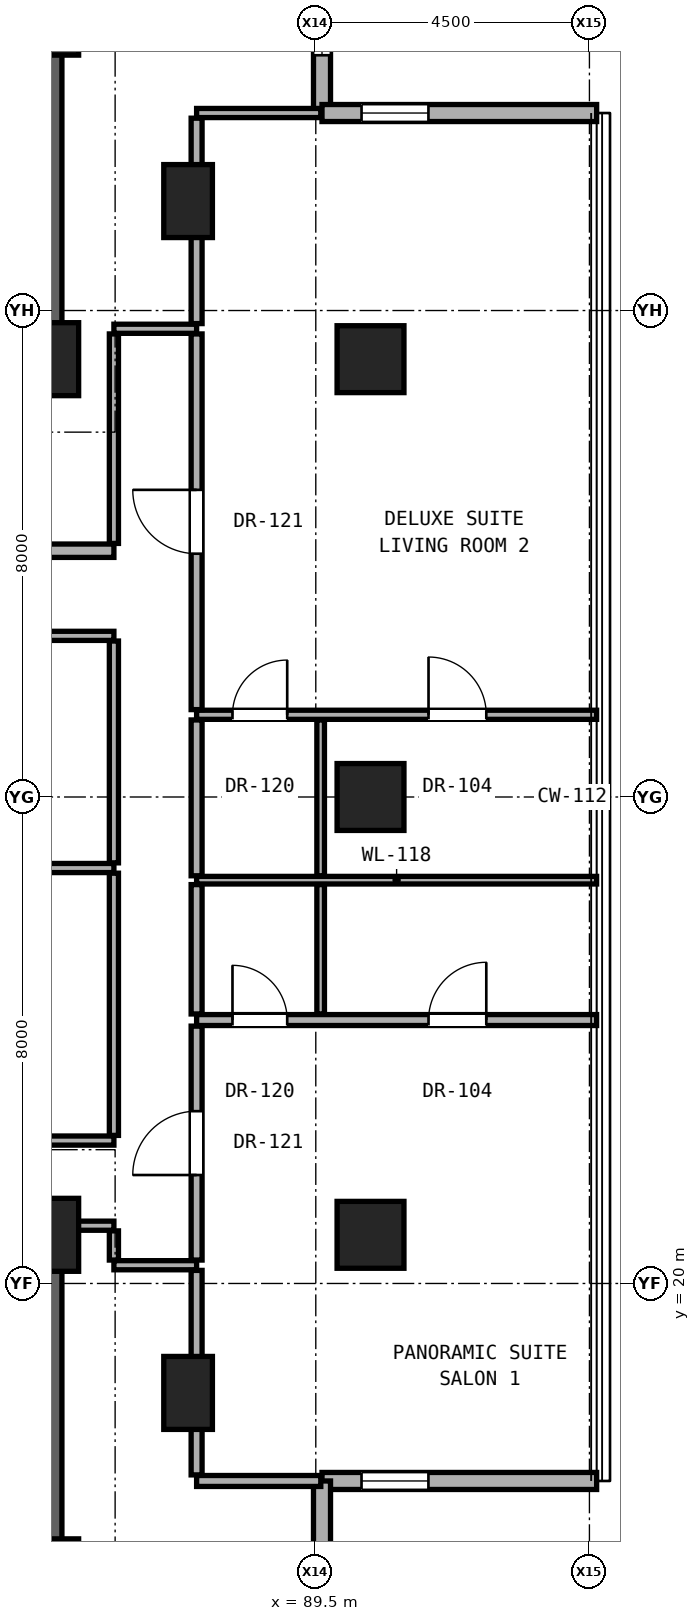
"""IFC4 building model, lengths in metres.
Left out: names, types, materials, properties, quantities, classifications, styles, units other than length and angle.
Written with IfcOpenShell. Run it as: python <this file> out.ifc"""

import sys

from ifc_helpers import new_model, si_unit, direction, frame, frame_2d, origin, origin_2d, place, context, subcontext, project, spatial, rectangle, hollow_rectangle, extrude, element, fill, save


model = new_model("IFC4")
c1 = context("Model", 3, precision=1e-05, world=origin(), true_north=direction((0.0, 1.0)))
c2 = subcontext(c1, "Body", "Model", "MODEL_VIEW")
j1 = project(units=[si_unit("LENGTHUNIT", "METRE"), si_unit("PLANEANGLEUNIT", "RADIAN")], contexts=[c1])
p1 = place(None, origin())
s1 = spatial("IfcSite", under=j1, at=p1, CompositionType="ELEMENT")
p2 = place(p1, origin())
s2 = spatial("IfcBuilding", under=s1, at=p2, CompositionType="ELEMENT")
p3 = place(p2, frame((0.0, 0.0, 95.0)))
s3 = spatial("IfcBuildingStorey", under=s2, at=p3, CompositionType="ELEMENT", Elevation=95.0)
for number, where, z_axis, x_axis in (
    (1, (85.0, 15.2, 0.0), (0.0, 0.0, 1.0), (1.0, 0.0, 0.0)),
    (2, (85.0, 20.8, 0.0), (0.0, 0.0, 1.0), (1.0, 0.0, 0.0)),
    (3, (85.0, 35.2, 0.0), (0.0, 0.0, 1.0), (1.0, 0.0, 0.0)),
    (4, (85.0, 40.8, 0.0), (0.0, 0.0, 1.0), (1.0, 0.0, 0.0)),
):
    element("IfcColumn", number, at=place(p3, frame(where, z_axis=z_axis, x_axis=x_axis)), inside=s3, PredefinedType="COLUMN", context=c2, shape_type="SweptSolid", body=[
        extrude(rectangle(XDim=1.2, YDim=1.2, at=origin_2d()), origin(), (0.0, 0.0, 1.0), 3.3),
    ])
for number, where, z_axis, x_axis in (
    (5, (90.4, 20.8, 0.0), (0.0, 0.0, 1.0), (1.0, 0.0, 0.0)),
    (6, (90.4, 28.0, 0.0), (0.0, 0.0, 1.0), (1.0, 0.0, 0.0)),
    (7, (90.4, 35.2, 0.0), (0.0, 0.0, 1.0), (1.0, 0.0, 0.0)),
):
    element("IfcColumn", number, at=place(p3, frame(where, z_axis=z_axis, x_axis=x_axis)), inside=s3, PredefinedType="COLUMN", context=c2, shape_type="SweptSolid", body=[
        extrude(hollow_rectangle(XDim=1.1, YDim=1.1, WallThickness=0.06, at=origin_2d()), origin(), (0.0, 0.0, 1.0), 3.3),
    ])
for number, where, z_axis, x_axis in (
    (8, (87.4, 18.2, 0.0), (0.0, 0.0, 1.0), (1.0, 0.0, 0.0)),
    (9, (87.4, 37.8, 0.0), (0.0, 0.0, 1.0), (1.0, 0.0, 0.0)),
):
    element("IfcColumn", number, at=place(p3, frame(where, z_axis=z_axis, x_axis=x_axis)), inside=s3, PredefinedType="PILASTER", context=c2, shape_type="SweptSolid", body=[
        extrude(rectangle(XDim=0.8, YDim=1.2, at=origin_2d()), origin(), (0.0, 0.0, 1.0), 3.3),
    ])
for number, where, z_axis, x_axis in (
    (10, (85.0, 35.2, 0.0), (0.0, 0.0, 1.0), (0.0, 1.0, 0.0)),
    (11, (85.0, 15.2, 0.0), (0.0, 0.0, 1.0), (0.0, 1.0, 0.0)),
):
    element("IfcWall", number, at=place(p3, frame(where, z_axis=z_axis, x_axis=x_axis)), inside=s3, PredefinedType="SHEAR", context=c2, shape_type="SweptSolid", body=[
        extrude(rectangle(XDim=5.6, YDim=0.65, at=frame_2d((2.8, 0.0))), origin(), (0.0, 0.0, 1.0), 3.08),
    ])
p4 = place(p3, frame((89.602, 39.248, 0.0), z_axis=(0.0, 0.0, 1.0), x_axis=(0.0, 1.0, 0.0)))
e12 = element("IfcWall", 12, at=p4, inside=s3, PredefinedType="SOLIDWALL", context=c2, shape_type="SweptSolid", body=[
    extrude(rectangle(XDim=4.516, YDim=0.28, at=frame_2d((2.258, 0.0))), origin(), (0.0, 0.0, 1.0), 3.06),
])
p5 = place(p4, frame((0.95, 0.0, 0.85)))
e13 = element("IfcOpeningElement", 13, at=p5, cuts=e12, PredefinedType="OPENING", context=c2, shape_type="SweptSolid", body=[
    extrude(rectangle(XDim=1.1, YDim=2.0, at=frame_2d((0.55, 1.0))), frame((0.0, 0.15, 0.0), z_axis=(0.0, -1.0, 0.0), x_axis=(1.0, 0.0, 0.0)), (0.0, 0.0, 1.0), 0.3),
])
p6 = place(p3, frame((89.602, 16.752, 0.0), z_axis=(0.0, 0.0, 1.0), x_axis=(1.0, 0.0, 0.0)))
e14 = element("IfcWall", 14, at=p6, inside=s3, PredefinedType="SOLIDWALL", context=c2, shape_type="SweptSolid", body=[
    extrude(rectangle(XDim=4.516, YDim=0.28, at=frame_2d((2.258, 0.0))), origin(), (0.0, 0.0, 1.0), 3.06),
])
p7 = place(p6, frame((0.65, 0.0, 0.85)))
e15 = element("IfcOpeningElement", 15, at=p7, cuts=e14, PredefinedType="OPENING", context=c2, shape_type="SweptSolid", body=[
    extrude(rectangle(XDim=1.1, YDim=2.0, at=frame_2d((0.55, 1.0))), frame((0.0, 0.15, 0.0), z_axis=(0.0, -1.0, 0.0), x_axis=(1.0, 0.0, 0.0)), (0.0, 0.0, 1.0), 0.3),
])
p8 = place(p3, frame((89.602, 12.236, 0.0), z_axis=(0.0, 0.0, 1.0), x_axis=(0.0, 1.0, 0.0)))
e16 = element("IfcWall", 16, at=p8, inside=s3, PredefinedType="SOLIDWALL", context=c2, shape_type="SweptSolid", body=[
    extrude(rectangle(XDim=4.516, YDim=0.28, at=frame_2d((2.258, 0.0))), origin(), (0.0, 0.0, 1.0), 3.06),
])
p9 = place(p3, frame((94.118, 39.248, 0.0), z_axis=(0.0, 0.0, 1.0), x_axis=(-1.0, 0.0, 0.0)))
e17 = element("IfcWall", 17, at=p9, inside=s3, PredefinedType="SOLIDWALL", context=c2, shape_type="SweptSolid", body=[
    extrude(rectangle(XDim=4.516, YDim=0.28, at=frame_2d((2.258, 0.0))), origin(), (0.0, 0.0, 1.0), 3.06),
])
p10 = place(p9, frame((2.766, 0.0, 0.85)))
e18 = element("IfcOpeningElement", 18, at=p10, cuts=e17, PredefinedType="OPENING", context=c2, shape_type="SweptSolid", body=[
    extrude(rectangle(XDim=1.1, YDim=2.0, at=frame_2d((0.55, 1.0))), frame((0.0, 0.15, 0.0), z_axis=(0.0, -1.0, 0.0), x_axis=(1.0, 0.0, 0.0)), (0.0, 0.0, 1.0), 0.3),
])
p11 = place(p3, frame((87.54, 16.752, 0.0), z_axis=(0.0, 0.0, 1.0), x_axis=(1.0, 0.0, 0.0)))
e19 = element("IfcWall", 19, at=p11, inside=s3, PredefinedType="PARTITIONING", context=c2, shape_type="SweptSolid", body=[
    extrude(rectangle(XDim=2.042, YDim=0.18, at=frame_2d((1.021, 0.0))), origin(), (0.0, 0.0, 1.0), 3.08),
])
p12 = place(p3, frame((86.18, 20.3, 0.0), z_axis=(0.0, 0.0, 1.0), x_axis=(1.0, 0.0, 0.0)))
e20 = element("IfcWall", 20, at=p12, inside=s3, PredefinedType="PARTITIONING", context=c2, shape_type="SweptSolid", body=[
    extrude(rectangle(XDim=1.36, YDim=0.15, at=frame_2d((0.68, 0.0))), origin(), (0.0, 0.0, 1.0), 3.08),
])
p13 = place(p3, frame((85.32, 20.95, 0.0), z_axis=(0.0, 0.0, 1.0), x_axis=(1.0, 0.0, 0.0)))
e21 = element("IfcWall", 21, at=p13, inside=s3, PredefinedType="PARTITIONING", context=c2, shape_type="SweptSolid", body=[
    extrude(rectangle(XDim=0.86, YDim=0.15, at=frame_2d((0.43, 0.0))), origin(), (0.0, 0.0, 1.0), 2.472),
])
p14 = place(p3, frame((66.68, 22.35, 0.0), z_axis=(0.0, 0.0, 1.0), x_axis=(1.0, 0.0, 0.0)))
e22 = element("IfcWall", 22, at=p14, inside=s3, PredefinedType="PARTITIONING", context=c2, shape_type="SweptSolid", body=[
    extrude(rectangle(XDim=19.5, YDim=0.15, at=frame_2d((9.75, 0.0))), origin(), (0.0, 0.0, 1.0), 2.145),
])
p15 = place(p14, frame((11.99, 0.0, 0.0)))
e23 = element("IfcOpeningElement", 23, at=p15, cuts=e22, PredefinedType="OPENING", context=c2, shape_type="SweptSolid", body=[
    extrude(rectangle(XDim=0.85, YDim=2.01, at=frame_2d((0.425, 1.005))), frame((0.0, 0.085, 0.0), z_axis=(0.0, -1.0, 0.0), x_axis=(1.0, 0.0, 0.0)), (0.0, 0.0, 1.0), 0.17),
])
p16 = place(p3, frame((87.54, 24.332, 0.0), z_axis=(0.0, 0.0, 1.0), x_axis=(1.0, 0.0, 0.0)))
e24 = element("IfcWall", 24, at=p16, inside=s3, PredefinedType="PARTITIONING", context=c2, shape_type="SweptSolid", body=[
    extrude(rectangle(XDim=6.578, YDim=0.18, at=frame_2d((3.289, 0.0))), origin(), (0.0, 0.0, 1.0), 2.216),
])
p17 = place(p16, frame((3.814, 0.0, 0.0)))
e25 = element("IfcOpeningElement", 25, at=p17, cuts=e24, PredefinedType="OPENING", context=c2, shape_type="SweptSolid", body=[
    extrude(rectangle(XDim=0.95, YDim=2.15, at=frame_2d((0.475, 1.075))), frame((0.0, 0.1, 0.0), z_axis=(0.0, -1.0, 0.0), x_axis=(1.0, 0.0, 0.0)), (0.0, 0.0, 1.0), 0.2),
])
p18 = place(p16, frame((0.59, 0.0, 0.0)))
e26 = element("IfcOpeningElement", 26, at=p18, cuts=e24, PredefinedType="OPENING", context=c2, shape_type="SweptSolid", body=[
    extrude(rectangle(XDim=0.9, YDim=2.1, at=frame_2d((0.45, 1.05))), frame((0.0, 0.1, 0.0), z_axis=(0.0, -1.0, 0.0), x_axis=(1.0, 0.0, 0.0)), (0.0, 0.0, 1.0), 0.2),
])
p19 = place(p3, frame((87.54, 26.632, 0.0), z_axis=(0.0, 0.0, 1.0), x_axis=(1.0, 0.0, 0.0)))
e27 = element("IfcWall", 27, at=p19, inside=s3, PredefinedType="PARTITIONING", context=c2, shape_type="SweptSolid", body=[
    extrude(rectangle(XDim=6.578, YDim=0.125, at=frame_2d((3.289, 0.0))), origin(), (0.0, 0.0, 1.0), 2.216),
])
p20 = place(p3, frame((72.05, 26.832, 0.0), z_axis=(0.0, 0.0, 1.0), x_axis=(1.0, 0.0, 0.0)))
e28 = element("IfcWall", 28, at=p20, inside=s3, PredefinedType="PARTITIONING", context=c2, shape_type="SweptSolid", body=[
    extrude(rectangle(XDim=14.13, YDim=0.15, at=frame_2d((7.065, 0.0))), origin(), (0.0, 0.0, 1.0), 2.145),
])
p21 = place(p3, frame((87.54, 29.352, 0.0), z_axis=(0.0, 0.0, 1.0), x_axis=(1.0, 0.0, 0.0)))
e29 = element("IfcWall", 29, at=p21, inside=s3, PredefinedType="PARTITIONING", context=c2, shape_type="SweptSolid", body=[
    extrude(rectangle(XDim=6.578, YDim=0.15, at=frame_2d((3.289, 0.0))), origin(), (0.0, 0.0, 1.0), 2.216),
])
p22 = place(p21, frame((3.814, 0.0, 0.0)))
e30 = element("IfcOpeningElement", 30, at=p22, cuts=e29, PredefinedType="OPENING", context=c2, shape_type="SweptSolid", body=[
    extrude(rectangle(XDim=0.95, YDim=2.15, at=frame_2d((0.475, 1.075))), frame((0.0, 0.085, 0.0), z_axis=(0.0, -1.0, 0.0), x_axis=(1.0, 0.0, 0.0)), (0.0, 0.0, 1.0), 0.17),
])
p23 = place(p21, frame((0.59, 0.0, 0.0)))
e31 = element("IfcOpeningElement", 31, at=p23, cuts=e29, PredefinedType="OPENING", context=c2, shape_type="SweptSolid", body=[
    extrude(rectangle(XDim=0.9, YDim=2.1, at=frame_2d((0.45, 1.05))), frame((0.0, 0.085, 0.0), z_axis=(0.0, -1.0, 0.0), x_axis=(1.0, 0.0, 0.0)), (0.0, 0.0, 1.0), 0.17),
])
p24 = place(p3, frame((66.68, 30.65, 0.0), z_axis=(0.0, 0.0, 1.0), x_axis=(1.0, 0.0, 0.0)))
e32 = element("IfcWall", 32, at=p24, inside=s3, PredefinedType="PARTITIONING", context=c2, shape_type="SweptSolid", body=[
    extrude(rectangle(XDim=19.5, YDim=0.15, at=frame_2d((9.75, 0.0))), origin(), (0.0, 0.0, 1.0), 2.145),
])
p25 = place(p24, frame((3.795, 0.0, 0.0)))
e33 = element("IfcOpeningElement", 33, at=p25, cuts=e32, PredefinedType="OPENING", context=c2, shape_type="SweptSolid", body=[
    extrude(rectangle(XDim=0.85, YDim=2.01, at=frame_2d((0.425, 1.005))), frame((0.0, 0.085, 0.0), z_axis=(0.0, -1.0, 0.0), x_axis=(1.0, 0.0, 0.0)), (0.0, 0.0, 1.0), 0.17),
])
p26 = place(p24, frame((11.99, 0.0, 0.0)))
e34 = element("IfcOpeningElement", 34, at=p26, cuts=e32, PredefinedType="OPENING", context=c2, shape_type="SweptSolid", body=[
    extrude(rectangle(XDim=0.85, YDim=2.01, at=frame_2d((0.425, 1.005))), frame((0.0, 0.085, 0.0), z_axis=(0.0, -1.0, 0.0), x_axis=(1.0, 0.0, 0.0)), (0.0, 0.0, 1.0), 0.17),
])
p27 = place(p3, frame((71.55, 32.05, 0.0), z_axis=(0.0, 0.0, 1.0), x_axis=(1.0, 0.0, 0.0)))
e35 = element("IfcWall", 35, at=p27, inside=s3, PredefinedType="SOLIDWALL", context=c2, shape_type="SweptSolid", body=[
    extrude(rectangle(XDim=14.63, YDim=0.22, at=frame_2d((7.315, 0.0))), origin(), (0.0, 0.0, 1.0), 2.145),
])
p28 = place(p27, frame((6.065, 0.0, 0.0)))
e36 = element("IfcOpeningElement", 36, at=p28, cuts=e35, PredefinedType="OPENING", context=c2, shape_type="SweptSolid", body=[
    extrude(rectangle(XDim=0.85, YDim=2.01, at=frame_2d((0.425, 1.005))), frame((0.0, 0.12, 0.0), z_axis=(0.0, -1.0, 0.0), x_axis=(1.0, 0.0, 0.0)), (0.0, 0.0, 1.0), 0.24),
])
p29 = place(p27, frame((1.65, 0.0, 0.0)))
e37 = element("IfcOpeningElement", 37, at=p29, cuts=e35, PredefinedType="OPENING", context=c2, shape_type="SweptSolid", body=[
    extrude(rectangle(XDim=0.85, YDim=2.01, at=frame_2d((0.425, 1.005))), frame((0.0, 0.12, 0.0), z_axis=(0.0, -1.0, 0.0), x_axis=(1.0, 0.0, 0.0)), (0.0, 0.0, 1.0), 0.24),
])
p30 = place(p3, frame((86.18, 35.7, 0.0), z_axis=(0.0, 0.0, 1.0), x_axis=(1.0, 0.0, 0.0)))
e38 = element("IfcWall", 38, at=p30, inside=s3, PredefinedType="PARTITIONING", context=c2, shape_type="SweptSolid", body=[
    extrude(rectangle(XDim=1.36, YDim=0.15, at=frame_2d((0.68, 0.0))), origin(), (0.0, 0.0, 1.0), 3.08),
])
p31 = place(p3, frame((87.54, 39.248, 0.0), z_axis=(0.0, 0.0, 1.0), x_axis=(1.0, 0.0, 0.0)))
e39 = element("IfcWall", 39, at=p31, inside=s3, PredefinedType="PARTITIONING", context=c2, shape_type="SweptSolid", body=[
    extrude(rectangle(XDim=2.042, YDim=0.15, at=frame_2d((1.021, 0.0))), origin(), (0.0, 0.0, 1.0), 3.08),
])
p32 = place(p3, frame((86.18, 20.385, 0.0), z_axis=(0.0, 0.0, 1.0), x_axis=(0.0, 1.0, 0.0)))
e40 = element("IfcWall", 40, at=p32, inside=s3, PredefinedType="PARTITIONING", context=c2, shape_type="SweptSolid", body=[
    extrude(rectangle(XDim=0.48, YDim=0.15, at=frame_2d((0.24, 0.0))), origin(), (0.0, 0.0, 1.0), 2.472),
])
p33 = place(p3, frame((86.18, 22.435, 0.0), z_axis=(0.0, 0.0, 1.0), x_axis=(0.0, 1.0, 0.0)))
e41 = element("IfcWall", 41, at=p33, inside=s3, PredefinedType="PARTITIONING", context=c2, shape_type="SweptSolid", body=[
    extrude(rectangle(XDim=4.312, YDim=0.15, at=frame_2d((2.156, 0.0))), origin(), (0.0, 0.0, 1.0), 3.08),
])
p34 = place(p3, frame((86.18, 26.917, 0.0), z_axis=(0.0, 0.0, 1.0), x_axis=(0.0, 1.0, 0.0)))
e42 = element("IfcWall", 42, at=p34, inside=s3, PredefinedType="PARTITIONING", context=c2, shape_type="SweptSolid", body=[
    extrude(rectangle(XDim=3.648, YDim=0.15, at=frame_2d((1.824, 0.0))), origin(), (0.0, 0.0, 1.0), 2.299),
])
p35 = place(p3, frame((86.18, 32.17, 0.0), z_axis=(0.0, 0.0, 1.0), x_axis=(0.0, 1.0, 0.0)))
e43 = element("IfcWall", 43, at=p35, inside=s3, PredefinedType="PARTITIONING", context=c2, shape_type="SweptSolid", body=[
    extrude(rectangle(XDim=3.445, YDim=0.15, at=frame_2d((1.723, 0.0))), origin(), (0.0, 0.0, 1.0), 2.472),
])
p36 = place(p3, frame((87.54, 16.852, 0.0), z_axis=(0.0, 0.0, 1.0), x_axis=(0.0, 1.0, 0.0)))
e44 = element("IfcWall", 44, at=p36, inside=s3, PredefinedType="PARTITIONING", context=c2, shape_type="SweptSolid", body=[
    extrude(rectangle(XDim=3.363, YDim=0.18, at=frame_2d((1.682, 0.0))), origin(), (0.0, 0.0, 1.0), 2.456),
])
p37 = place(p3, frame((87.54, 20.385, 0.0), z_axis=(0.0, 0.0, 1.0), x_axis=(0.0, 1.0, 0.0)))
e45 = element("IfcWall", 45, at=p37, inside=s3, PredefinedType="PARTITIONING", context=c2, shape_type="SweptSolid", body=[
    extrude(rectangle(XDim=3.847, YDim=0.18, at=frame_2d((1.923, 0.0))), origin(), (0.0, 0.0, 1.0), 2.472),
])
p38 = place(p37, frame((1.398, 0.0, 0.0)))
e46 = element("IfcOpeningElement", 46, at=p38, cuts=e45, PredefinedType="OPENING", context=c2, shape_type="SweptSolid", body=[
    extrude(rectangle(XDim=1.05, YDim=2.2, at=frame_2d((0.525, 1.1))), frame((0.0, 0.1, 0.0), z_axis=(0.0, -1.0, 0.0), x_axis=(1.0, 0.0, 0.0)), (0.0, 0.0, 1.0), 0.2),
])
p39 = place(p3, frame((87.54, 24.432, 0.0), z_axis=(0.0, 0.0, 1.0), x_axis=(0.0, 1.0, 0.0)))
e47 = element("IfcWall", 47, at=p39, inside=s3, PredefinedType="PARTITIONING", context=c2, shape_type="SweptSolid", body=[
    extrude(rectangle(XDim=2.128, YDim=0.18, at=frame_2d((1.064, 0.0))), origin(), (0.0, 0.0, 1.0), 3.08),
])
p40 = place(p3, frame((87.54, 26.705, 0.0), z_axis=(0.0, 0.0, 1.0), x_axis=(0.0, 1.0, 0.0)))
e48 = element("IfcWall", 48, at=p40, inside=s3, PredefinedType="PARTITIONING", context=c2, shape_type="SweptSolid", body=[
    extrude(rectangle(XDim=2.562, YDim=0.18, at=frame_2d((1.281, 0.0))), origin(), (0.0, 0.0, 1.0), 2.299),
])
p41 = place(p3, frame((87.54, 29.437, 0.0), z_axis=(0.0, 0.0, 1.0), x_axis=(0.0, 1.0, 0.0)))
e49 = element("IfcWall", 49, at=p41, inside=s3, PredefinedType="PARTITIONING", context=c2, shape_type="SweptSolid", body=[
    extrude(rectangle(XDim=6.178, YDim=0.18, at=frame_2d((3.089, 0.0))), origin(), (0.0, 0.0, 1.0), 2.472),
])
p42 = place(p41, frame((2.564, 0.0, 0.0)))
e50 = element("IfcOpeningElement", 50, at=p42, cuts=e49, PredefinedType="OPENING", context=c2, shape_type="SweptSolid", body=[
    extrude(rectangle(XDim=1.05, YDim=2.2, at=frame_2d((0.525, 1.1))), frame((0.0, 0.1, 0.0), z_axis=(0.0, -1.0, 0.0), x_axis=(1.0, 0.0, 0.0)), (0.0, 0.0, 1.0), 0.2),
])
p43 = place(p3, frame((87.54, 35.785, 0.0), z_axis=(0.0, 0.0, 1.0), x_axis=(0.0, 1.0, 0.0)))
e51 = element("IfcWall", 51, at=p43, inside=s3, PredefinedType="PARTITIONING", context=c2, shape_type="SweptSolid", body=[
    extrude(rectangle(XDim=3.378, YDim=0.18, at=frame_2d((1.689, 0.0))), origin(), (0.0, 0.0, 1.0), 2.456),
])
p44 = place(p3, frame((89.58, 24.432, 0.0), z_axis=(0.0, 0.0, 1.0), x_axis=(0.0, 1.0, 0.0)))
e52 = element("IfcWall", 52, at=p44, inside=s3, PredefinedType="PARTITIONING", context=c2, shape_type="SweptSolid", body=[
    extrude(rectangle(XDim=2.128, YDim=0.125, at=frame_2d((1.064, 0.0))), origin(), (0.0, 0.0, 1.0), 3.08),
])
p45 = place(p3, frame((89.58, 26.705, 0.0), z_axis=(0.0, 0.0, 1.0), x_axis=(0.0, 1.0, 0.0)))
e53 = element("IfcWall", 53, at=p45, inside=s3, PredefinedType="PARTITIONING", context=c2, shape_type="SweptSolid", body=[
    extrude(rectangle(XDim=2.562, YDim=0.125, at=frame_2d((1.281, 0.0))), origin(), (0.0, 0.0, 1.0), 2.299),
])
p46 = place(p5, origin())
e54 = element("IfcWindow", 54, at=p46, inside=s3, PartitioningType="SINGLE_PANEL", PredefinedType="WINDOW", context=c2, shape_type="SweptSolid", body=[
    extrude(rectangle(XDim=1.1, YDim=2.0, at=frame_2d((0.55, 1.0))), frame((0.0, 0.03, 0.0), z_axis=(0.0, -1.0, 0.0), x_axis=(1.0, 0.0, 0.0)), (0.0, 0.0, 1.0), 0.06),
])
fill(e13, e54)
p47 = place(p7, origin())
e55 = element("IfcWindow", 55, at=p47, inside=s3, PartitioningType="SINGLE_PANEL", PredefinedType="WINDOW", context=c2, shape_type="SweptSolid", body=[
    extrude(rectangle(XDim=1.1, YDim=2.0, at=frame_2d((0.55, 1.0))), frame((0.0, 0.03, 0.0), z_axis=(0.0, -1.0, 0.0), x_axis=(1.0, 0.0, 0.0)), (0.0, 0.0, 1.0), 0.06),
])
fill(e15, e55)
p48 = place(p10, origin())
e56 = element("IfcWindow", 56, at=p48, inside=s3, PartitioningType="SINGLE_PANEL", PredefinedType="WINDOW", context=c2, shape_type="SweptSolid", body=[
    extrude(rectangle(XDim=1.1, YDim=2.0, at=frame_2d((0.55, 1.0))), frame((0.0, 0.03, 0.0), z_axis=(0.0, -1.0, 0.0), x_axis=(1.0, 0.0, 0.0)), (0.0, 0.0, 1.0), 0.06),
])
fill(e18, e56)
p49 = place(p38, origin())
e57 = element("IfcDoor", 57, at=p49, inside=s3, OperationType="SINGLE_SWING_LEFT", PredefinedType="DOOR", context=c2, shape_type="SweptSolid", body=[
    extrude(rectangle(XDim=1.05, YDim=2.2, at=frame_2d((0.525, 1.1))), frame((0.0, 0.025, 0.0), z_axis=(0.0, -1.0, 0.0), x_axis=(1.0, 0.0, 0.0)), (0.0, 0.0, 1.0), 0.05),
])
fill(e46, e57)
p50 = place(p17, origin())
e58 = element("IfcDoor", 58, at=p50, inside=s3, OperationType="SINGLE_SWING_RIGHT", PredefinedType="DOOR", context=c2, shape_type="SweptSolid", body=[
    extrude(rectangle(XDim=0.95, YDim=2.15, at=frame_2d((0.475, 1.075))), frame((0.0, 0.025, 0.0), z_axis=(0.0, -1.0, 0.0), x_axis=(1.0, 0.0, 0.0)), (0.0, 0.0, 1.0), 0.05),
])
fill(e25, e58)
p51 = place(p18, origin())
e59 = element("IfcDoor", 59, at=p51, inside=s3, OperationType="SINGLE_SWING_LEFT", PredefinedType="DOOR", context=c2, shape_type="SweptSolid", body=[
    extrude(rectangle(XDim=0.9, YDim=2.1, at=frame_2d((0.45, 1.05))), frame((0.0, 0.025, 0.0), z_axis=(0.0, -1.0, 0.0), x_axis=(1.0, 0.0, 0.0)), (0.0, 0.0, 1.0), 0.05),
])
fill(e26, e59)
p52 = place(p42, origin())
e60 = element("IfcDoor", 60, at=p52, inside=s3, OperationType="SINGLE_SWING_RIGHT", PredefinedType="DOOR", context=c2, shape_type="SweptSolid", body=[
    extrude(rectangle(XDim=1.05, YDim=2.2, at=frame_2d((0.525, 1.1))), frame((0.0, 0.025, 0.0), z_axis=(0.0, -1.0, 0.0), x_axis=(1.0, 0.0, 0.0)), (0.0, 0.0, 1.0), 0.05),
])
fill(e50, e60)
p53 = place(p22, origin())
e61 = element("IfcDoor", 61, at=p53, inside=s3, OperationType="SINGLE_SWING_LEFT", PredefinedType="DOOR", context=c2, shape_type="SweptSolid", body=[
    extrude(rectangle(XDim=0.95, YDim=2.15, at=frame_2d((0.475, 1.075))), frame((0.0, 0.025, 0.0), z_axis=(0.0, -1.0, 0.0), x_axis=(1.0, 0.0, 0.0)), (0.0, 0.0, 1.0), 0.05),
])
fill(e30, e61)
p54 = place(p23, origin())
e62 = element("IfcDoor", 62, at=p54, inside=s3, OperationType="SINGLE_SWING_RIGHT", PredefinedType="DOOR", context=c2, shape_type="SweptSolid", body=[
    extrude(rectangle(XDim=0.9, YDim=2.1, at=frame_2d((0.45, 1.05))), frame((0.0, 0.025, 0.0), z_axis=(0.0, -1.0, 0.0), x_axis=(1.0, 0.0, 0.0)), (0.0, 0.0, 1.0), 0.05),
])
fill(e31, e62)
save(model, sys.argv[1])
